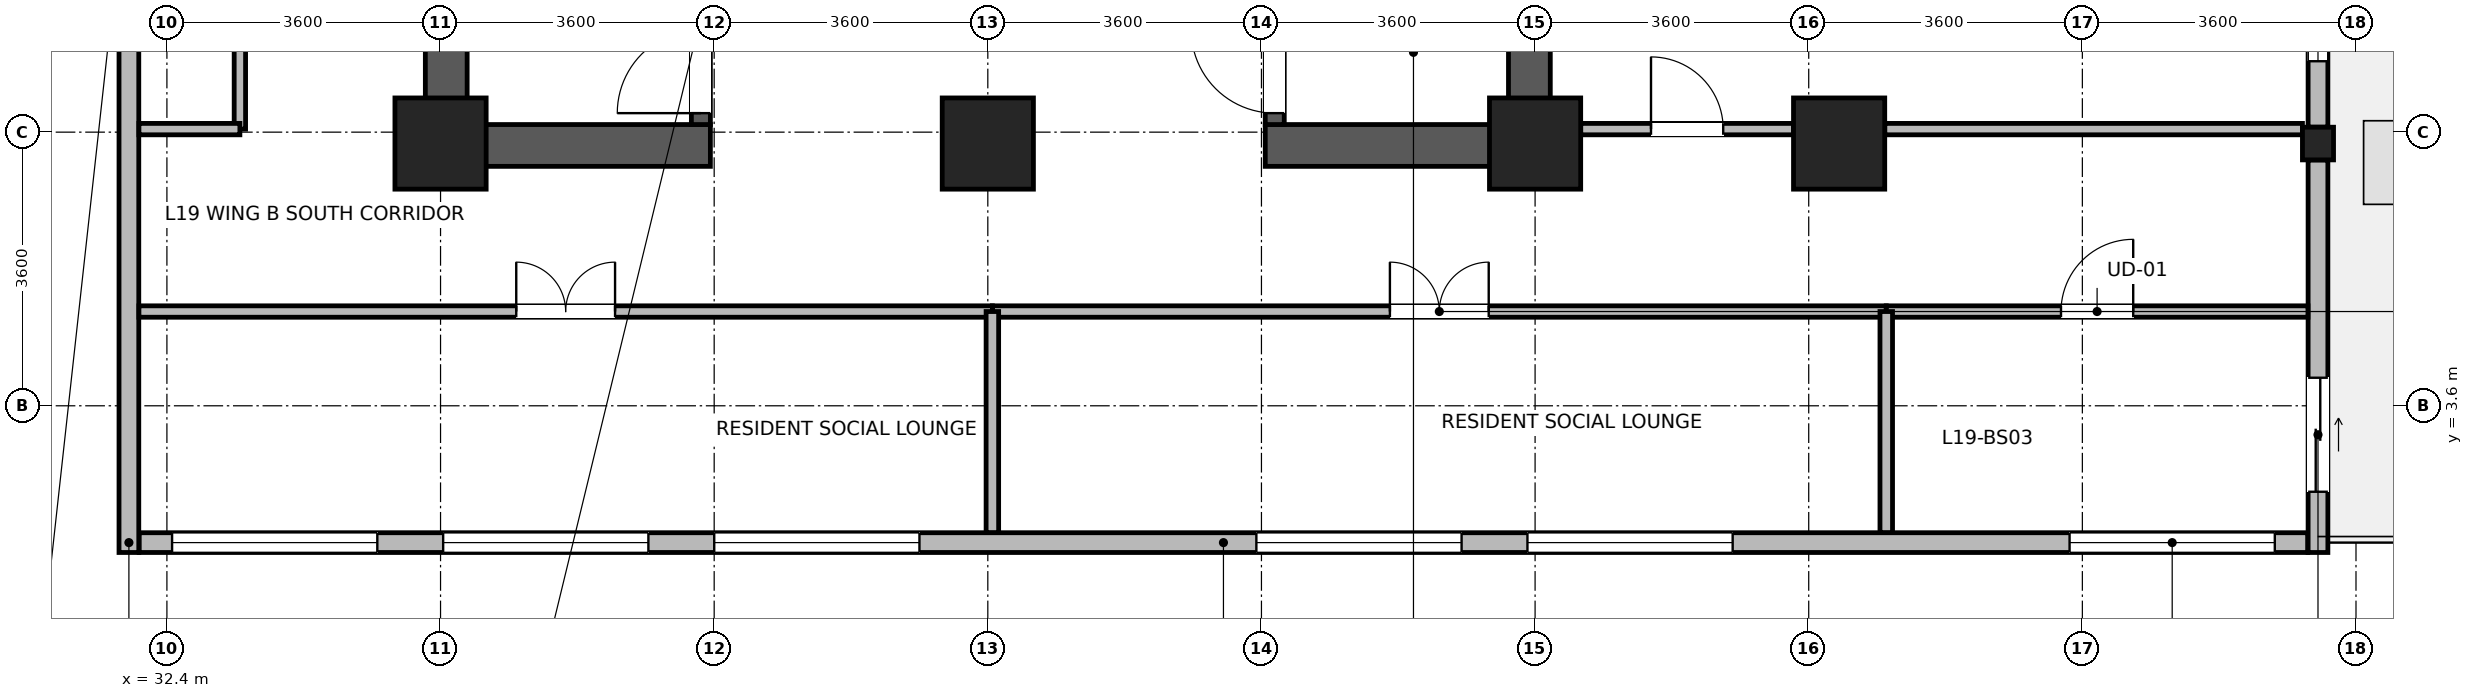
"""IFC4 building model, lengths in metres.
Left out: names, types, materials, properties, quantities, classifications, styles, units other than length and angle.
Written with IfcOpenShell. Run it as: python <this file> out.ifc"""

import sys

from ifc_helpers import new_model, si_unit, direction, frame, frame_2d, origin, origin_2d, place, context, subcontext, project, spatial, rectangle, i_section, extrude, source, transform, mapped, element, fill, save


model = new_model("IFC4")
c1 = context("Model", 3, precision=1e-05, world=origin(), true_north=direction((0.0, 1.0)))
c2 = subcontext(c1, "Body", "Model", "MODEL_VIEW")
j1 = project(units=[si_unit("LENGTHUNIT", "METRE"), si_unit("PLANEANGLEUNIT", "RADIAN")], contexts=[c1])
p1 = place(None, origin())
s1 = spatial("IfcSite", under=j1, at=p1, CompositionType="ELEMENT")
p2 = place(p1, origin())
s2 = spatial("IfcBuilding", under=s1, at=p2, CompositionType="ELEMENT")
p3 = place(p2, frame((0.0, 0.0, 78.6)))
s3 = spatial("IfcBuildingStorey", under=s2, at=p3, CompositionType="ELEMENT", Elevation=78.6)
for number, where, z_axis, x_axis in (
    (1, (36.075, 6.75, 0.0), (0.0, 0.0, 1.0), (0.0, 1.0, 0.0)),
    (2, (50.325, 6.75, 0.0), (0.0, 0.0, 1.0), (0.0, 1.0, 0.0)),
):
    element("IfcWall", number, at=place(p3, frame(where, z_axis=z_axis, x_axis=x_axis)), inside=s3, PredefinedType="SHEAR", context=c2, shape_type="SweptSolid", body=[
        extrude(rectangle(XDim=8.1, YDim=0.55, at=frame_2d((4.05, 0.0))), origin(), (0.0, 0.0, 1.0), 3.45),
    ])
for number, where, z_axis, x_axis in (
    (3, (36.35, 7.025, 0.0), (0.0, 0.0, 1.0), (1.0, 0.0, 0.0)),
    (4, (46.85, 7.025, 0.0), (0.0, 0.0, 1.0), (1.0, 0.0, 0.0)),
):
    element("IfcWall", number, at=place(p3, frame(where, z_axis=z_axis, x_axis=x_axis)), inside=s3, PredefinedType="SHEAR", context=c2, shape_type="SweptSolid", body=[
        extrude(rectangle(XDim=3.2, YDim=0.55, at=frame_2d((1.6, 0.0))), origin(), (0.0, 0.0, 1.0), 3.45),
    ])
p4 = place(p3, frame((39.425, 7.3, 0.0), z_axis=(0.0, 0.0, 1.0), x_axis=(0.0, 1.0, 0.0)))
e5 = element("IfcWall", 5, at=p4, inside=s3, PredefinedType="SHEAR", context=c2, shape_type="SweptSolid", body=[
    extrude(rectangle(XDim=7.0, YDim=0.25, at=frame_2d((3.5, 0.0))), origin(), (0.0, 0.0, 1.0), 3.45),
])
p5 = place(p4, frame((0.15, 0.0, 0.0)))
e6 = element("IfcOpeningElement", 6, at=p5, cuts=e5, PredefinedType="OPENING", context=c2, shape_type="SweptSolid", body=[
    extrude(rectangle(XDim=1.1, YDim=2.08, at=frame_2d((0.55, 1.04))), frame((0.0, 0.135, 0.0), z_axis=(0.0, -1.0, 0.0), x_axis=(1.0, 0.0, 0.0)), (0.0, 0.0, 1.0), 0.27),
])
p6 = place(p3, frame((46.975, 7.3, 0.0), z_axis=(0.0, 0.0, 1.0), x_axis=(0.0, 1.0, 0.0)))
e7 = element("IfcWall", 7, at=p6, inside=s3, PredefinedType="SHEAR", context=c2, shape_type="SweptSolid", body=[
    extrude(rectangle(XDim=7.0, YDim=0.25, at=frame_2d((3.5, 0.0))), origin(), (0.0, 0.0, 1.0), 3.45),
])
p7 = place(p6, frame((0.15, 0.0, 0.0)))
e8 = element("IfcOpeningElement", 8, at=p7, cuts=e7, PredefinedType="OPENING", context=c2, shape_type="SweptSolid", body=[
    extrude(rectangle(XDim=1.1, YDim=2.08, at=frame_2d((0.55, 1.04))), frame((0.0, 0.135, 0.0), z_axis=(0.0, -1.0, 0.0), x_axis=(1.0, 0.0, 0.0)), (0.0, 0.0, 1.0), 0.27),
])
m1 = source(origin(), c2, "Body", "SweptSolid", [
    extrude(rectangle(XDim=1.2, YDim=1.2, at=origin_2d()), origin(), (0.0, 0.0, 1.0), 3.7),
])
for number, where, z_axis, x_axis in (
    (9, (36.0, 7.05, 0.0), (0.0, 0.0, 1.0), (1.0, 0.0, 0.0)),
    (10, (43.2, 7.05, 0.0), (0.0, 0.0, 1.0), (1.0, 0.0, 0.0)),
    (11, (50.4, 7.05, 0.0), (0.0, 0.0, 1.0), (1.0, 0.0, 0.0)),
    (12, (54.4, 7.05, 0.0), (0.0, 0.0, 1.0), (1.0, 0.0, 0.0)),
):
    element("IfcColumn", number, at=place(p3, frame(where, z_axis=z_axis, x_axis=x_axis)), inside=s3, PredefinedType="COLUMN", context=c2, shape_type="MappedRepresentation", body=[
        mapped(m1, transform((0.0, 0.0, 0.0), x_axis=(1.0, 0.0, 0.0), y_axis=(0.0, 1.0, 0.0), z_axis=(0.0, 0.0, 1.0), scale=1.0)),
    ])
m2 = source(origin(), c2, "Body", "SweptSolid", [
    extrude(i_section(OverallWidth=0.409, OverallDepth=0.43, WebThickness=0.024, FlangeThickness=0.033, FilletRadius=0.015, at=origin_2d()), origin(), (0.0, 0.0, 1.0), 3.7),
])
p8 = place(p3, frame((60.7, 7.05, 0.0), z_axis=(0.0, 0.0, 1.0), x_axis=(1.0, 0.0, 0.0)))
e13 = element("IfcColumn", 13, at=p8, inside=s3, PredefinedType="COLUMN", context=c2, shape_type="MappedRepresentation", body=[
    mapped(m2, transform((0.0, 0.0, 0.0), x_axis=(1.0, 0.0, 0.0), y_axis=(0.0, 1.0, 0.0), z_axis=(0.0, 0.0, 1.0), scale=1.0)),
])
p9 = place(p3, frame((60.565, 1.8, 0.0), z_axis=(0.0, 0.0, 1.0), x_axis=(-1.0, 0.0, 0.0)))
e14 = element("IfcWall", 14, at=p9, inside=s3, PredefinedType="STANDARD", context=c2, shape_type="SweptSolid", body=[
    extrude(rectangle(XDim=28.53, YDim=0.26, at=frame_2d((14.265, 0.0))), origin(), (0.0, 0.0, 1.0), 3.43),
])
p10 = place(p9, frame((0.433, 0.0, 0.85)))
e15 = element("IfcOpeningElement", 15, at=p10, cuts=e14, PredefinedType="OPENING", context=c2, shape_type="SweptSolid", body=[
    extrude(rectangle(XDim=2.7, YDim=2.05, at=frame_2d((1.35, 1.025))), frame((0.0, 0.14, 0.0), z_axis=(0.0, -1.0, 0.0), x_axis=(1.0, 0.0, 0.0)), (0.0, 0.0, 1.0), 0.28),
])
p11 = place(p9, frame((7.566, 0.0, 0.85)))
e16 = element("IfcOpeningElement", 16, at=p11, cuts=e14, PredefinedType="OPENING", context=c2, shape_type="SweptSolid", body=[
    extrude(rectangle(XDim=2.7, YDim=2.05, at=frame_2d((1.35, 1.025))), frame((0.0, 0.14, 0.0), z_axis=(0.0, -1.0, 0.0), x_axis=(1.0, 0.0, 0.0)), (0.0, 0.0, 1.0), 0.28),
])
p12 = place(p9, frame((11.132, 0.0, 0.85)))
e17 = element("IfcOpeningElement", 17, at=p12, cuts=e14, PredefinedType="OPENING", context=c2, shape_type="SweptSolid", body=[
    extrude(rectangle(XDim=2.7, YDim=2.05, at=frame_2d((1.35, 1.025))), frame((0.0, 0.14, 0.0), z_axis=(0.0, -1.0, 0.0), x_axis=(1.0, 0.0, 0.0)), (0.0, 0.0, 1.0), 0.28),
])
p13 = place(p9, frame((18.264, 0.0, 0.85)))
e18 = element("IfcOpeningElement", 18, at=p13, cuts=e14, PredefinedType="OPENING", context=c2, shape_type="SweptSolid", body=[
    extrude(rectangle(XDim=2.7, YDim=2.05, at=frame_2d((1.35, 1.025))), frame((0.0, 0.14, 0.0), z_axis=(0.0, -1.0, 0.0), x_axis=(1.0, 0.0, 0.0)), (0.0, 0.0, 1.0), 0.28),
])
p14 = place(p9, frame((21.831, 0.0, 0.85)))
e19 = element("IfcOpeningElement", 19, at=p14, cuts=e14, PredefinedType="OPENING", context=c2, shape_type="SweptSolid", body=[
    extrude(rectangle(XDim=2.7, YDim=2.05, at=frame_2d((1.35, 1.025))), frame((0.0, 0.14, 0.0), z_axis=(0.0, -1.0, 0.0), x_axis=(1.0, 0.0, 0.0)), (0.0, 0.0, 1.0), 0.28),
])
p15 = place(p9, frame((25.397, 0.0, 0.85)))
e20 = element("IfcOpeningElement", 20, at=p15, cuts=e14, PredefinedType="OPENING", context=c2, shape_type="SweptSolid", body=[
    extrude(rectangle(XDim=2.7, YDim=2.05, at=frame_2d((1.35, 1.025))), frame((0.0, 0.14, 0.0), z_axis=(0.0, -1.0, 0.0), x_axis=(1.0, 0.0, 0.0)), (0.0, 0.0, 1.0), 0.28),
])
p16 = place(p3, frame((60.7, 6.834, 0.0), z_axis=(0.0, 0.0, 1.0), x_axis=(0.0, -1.0, 0.0)))
e21 = element("IfcWall", 21, at=p16, inside=s3, PredefinedType="STANDARD", context=c2, shape_type="SweptSolid", body=[
    extrude(rectangle(XDim=5.164, YDim=0.26, at=frame_2d((2.582, 0.0))), origin(), (0.0, 0.0, 1.0), 3.43),
])
p17 = place(p16, frame((2.865, 0.0, 0.0)))
e22 = element("IfcOpeningElement", 22, at=p17, cuts=e21, PredefinedType="OPENING", context=c2, shape_type="SweptSolid", body=[
    extrude(rectangle(XDim=1.5, YDim=2.15, at=frame_2d((0.75, 1.075))), frame((0.0, 0.14, 0.0), z_axis=(0.0, -1.0, 0.0), x_axis=(1.0, 0.0, 0.0)), (0.0, 0.0, 1.0), 0.28),
])
p18 = place(p3, frame((60.7, 14.334, 0.0), z_axis=(0.0, 0.0, 1.0), x_axis=(0.0, -1.0, 0.0)))
e23 = element("IfcWall", 23, at=p18, inside=s3, PredefinedType="STANDARD", context=c2, shape_type="SweptSolid", body=[
    extrude(rectangle(XDim=7.068, YDim=0.26, at=frame_2d((3.534, 0.0))), origin(), (0.0, 0.0, 1.0), 2.93),
])
p19 = place(p18, frame((0.867, 0.0, 0.85)))
e24 = element("IfcOpeningElement", 24, at=p19, cuts=e23, PredefinedType="OPENING", context=c2, shape_type="SweptSolid", body=[
    extrude(rectangle(XDim=1.8, YDim=1.85, at=frame_2d((0.9, 0.925))), frame((0.0, 0.14, 0.0), z_axis=(0.0, -1.0, 0.0), x_axis=(1.0, 0.0, 0.0)), (0.0, 0.0, 1.0), 0.28),
])
p20 = place(p18, frame((4.401, 0.0, 0.85)))
e25 = element("IfcOpeningElement", 25, at=p20, cuts=e23, PredefinedType="OPENING", context=c2, shape_type="SweptSolid", body=[
    extrude(rectangle(XDim=1.8, YDim=1.85, at=frame_2d((0.9, 0.925))), frame((0.0, 0.14, 0.0), z_axis=(0.0, -1.0, 0.0), x_axis=(1.0, 0.0, 0.0)), (0.0, 0.0, 1.0), 0.28),
])
p21 = place(p3, frame((31.9, 1.67, 0.0), z_axis=(0.0, 0.0, 1.0), x_axis=(0.0, 1.0, 0.0)))
e26 = element("IfcWall", 26, at=p21, inside=s3, PredefinedType="STANDARD", context=c2, shape_type="SweptSolid", body=[
    extrude(rectangle(XDim=20.06, YDim=0.26, at=frame_2d((10.03, 0.0))), origin(), (0.0, 0.0, 1.0), 3.43),
])
p22 = place(p21, frame((7.008, 0.0, 0.85)))
e27 = element("IfcOpeningElement", 27, at=p22, cuts=e26, PredefinedType="OPENING", context=c2, shape_type="SweptSolid", body=[
    extrude(rectangle(XDim=2.7, YDim=2.05, at=frame_2d((1.35, 1.025))), frame((0.0, 0.14, 0.0), z_axis=(0.0, -1.0, 0.0), x_axis=(1.0, 0.0, 0.0)), (0.0, 0.0, 1.0), 0.28),
])
p23 = place(p21, frame((13.695, 0.0, 0.85)))
e28 = element("IfcOpeningElement", 28, at=p23, cuts=e26, PredefinedType="OPENING", context=c2, shape_type="SweptSolid", body=[
    extrude(rectangle(XDim=2.7, YDim=2.05, at=frame_2d((1.35, 1.025))), frame((0.0, 0.14, 0.0), z_axis=(0.0, -1.0, 0.0), x_axis=(1.0, 0.0, 0.0)), (0.0, 0.0, 1.0), 0.28),
])
p24 = place(p3, frame((43.26, 4.84, 0.0), z_axis=(0.0, 0.0, 1.0), x_axis=(1.0, 0.0, 0.0)))
e29 = element("IfcWall", 29, at=p24, inside=s3, PredefinedType="PARTITIONING", context=c2, shape_type="SweptSolid", body=[
    extrude(rectangle(XDim=11.76, YDim=0.15, at=frame_2d((5.88, 0.0))), origin(), (0.0, 0.0, 1.0), 3.43),
])
p25 = place(p24, frame((5.23, 0.0, 0.0)))
e30 = element("IfcOpeningElement", 30, at=p25, cuts=e29, PredefinedType="OPENING", context=c2, shape_type="SweptSolid", body=[
    extrude(rectangle(XDim=1.3, YDim=2.12, at=frame_2d((0.65, 1.06))), frame((0.0, 0.085, 0.0), z_axis=(0.0, -1.0, 0.0), x_axis=(1.0, 0.0, 0.0)), (0.0, 0.0, 1.0), 0.17),
])
p26 = place(p3, frame((32.032, 4.84, 0.0), z_axis=(0.0, 0.0, 1.0), x_axis=(1.0, 0.0, 0.0)))
e31 = element("IfcWall", 31, at=p26, inside=s3, PredefinedType="PARTITIONING", context=c2, shape_type="SweptSolid", body=[
    extrude(rectangle(XDim=11.228, YDim=0.15, at=frame_2d((5.614, 0.0))), origin(), (0.0, 0.0, 1.0), 3.43),
])
p27 = place(p26, frame((4.964, 0.0, 0.0)))
e32 = element("IfcOpeningElement", 32, at=p27, cuts=e31, PredefinedType="OPENING", context=c2, shape_type="SweptSolid", body=[
    extrude(rectangle(XDim=1.3, YDim=2.12, at=frame_2d((0.65, 1.06))), frame((0.0, 0.085, 0.0), z_axis=(0.0, -1.0, 0.0), x_axis=(1.0, 0.0, 0.0)), (0.0, 0.0, 1.0), 0.17),
])
p28 = place(p3, frame((51.0, 7.24, 0.0), z_axis=(0.0, 0.0, 1.0), x_axis=(1.0, 0.0, 0.0)))
e33 = element("IfcWall", 33, at=p28, inside=s3, PredefinedType="PARTITIONING", context=c2, shape_type="SweptSolid", body=[
    extrude(rectangle(XDim=2.8, YDim=0.15, at=frame_2d((1.4, 0.0))), origin(), (0.0, 0.0, 1.0), 2.78),
])
p29 = place(p28, frame((0.925, 0.0, 0.0)))
e34 = element("IfcOpeningElement", 34, at=p29, cuts=e33, PredefinedType="OPENING", context=c2, shape_type="SweptSolid", body=[
    extrude(rectangle(XDim=0.95, YDim=2.1, at=frame_2d((0.475, 1.05))), frame((0.0, 0.085, 0.0), z_axis=(0.0, -1.0, 0.0), x_axis=(1.0, 0.0, 0.0)), (0.0, 0.0, 1.0), 0.17),
])
p30 = place(p3, frame((55.0, 7.24, 0.0), z_axis=(0.0, 0.0, 1.0), x_axis=(1.0, 0.0, 0.0)))
e35 = element("IfcWall", 35, at=p30, inside=s3, PredefinedType="PARTITIONING", context=c2, shape_type="SweptSolid", body=[
    extrude(rectangle(XDim=5.496, YDim=0.15, at=frame_2d((2.748, 0.0))), origin(), (0.0, 0.0, 1.0), 2.78),
])
p31 = place(p3, frame((33.36, 7.24, 0.0), z_axis=(0.0, 0.0, 1.0), x_axis=(0.0, 1.0, 0.0)))
e36 = element("IfcWall", 36, at=p31, inside=s3, PredefinedType="PARTITIONING", context=c2, shape_type="SweptSolid", body=[
    extrude(rectangle(XDim=7.26, YDim=0.15, at=frame_2d((3.63, 0.0))), origin(), (0.0, 0.0, 1.0), 3.43),
])
p32 = place(p31, frame((2.98, 0.0, 0.0)))
e37 = element("IfcOpeningElement", 37, at=p32, cuts=e36, PredefinedType="OPENING", context=c2, shape_type="SweptSolid", body=[
    extrude(rectangle(XDim=1.3, YDim=2.12, at=frame_2d((0.65, 1.06))), frame((0.0, 0.085, 0.0), z_axis=(0.0, -1.0, 0.0), x_axis=(1.0, 0.0, 0.0)), (0.0, 0.0, 1.0), 0.17),
])
p33 = place(p3, frame((55.02, 4.84, 0.0), z_axis=(0.0, 0.0, 1.0), x_axis=(1.0, 0.0, 0.0)))
e38 = element("IfcWall", 38, at=p33, inside=s3, PredefinedType="PARTITIONING", context=c2, shape_type="SweptSolid", body=[
    extrude(rectangle(XDim=5.548, YDim=0.15, at=frame_2d((2.774, 0.0))), origin(), (0.0, 0.0, 1.0), 3.43),
])
p34 = place(p33, frame((2.299, 0.0, 0.0)))
e39 = element("IfcOpeningElement", 39, at=p34, cuts=e38, PredefinedType="OPENING", context=c2, shape_type="SweptSolid", body=[
    extrude(rectangle(XDim=0.95, YDim=2.1, at=frame_2d((0.475, 1.05))), frame((0.0, 0.085, 0.0), z_axis=(0.0, -1.0, 0.0), x_axis=(1.0, 0.0, 0.0)), (0.0, 0.0, 1.0), 0.17),
])
p35 = place(p3, frame((32.032, 7.24, 0.0), z_axis=(0.0, 0.0, 1.0), x_axis=(1.0, 0.0, 0.0)))
e40 = element("IfcWall", 40, at=p35, inside=s3, PredefinedType="PARTITIONING", context=c2, shape_type="SweptSolid", body=[
    extrude(rectangle(XDim=1.328, YDim=0.15, at=frame_2d((0.664, 0.0))), origin(), (0.0, 0.0, 1.0), 3.43),
])
for number, where, z_axis, x_axis in (
    (41, (43.26, 1.932, 0.0), (0.0, 0.0, 1.0), (0.0, 1.0, 0.0)),
    (42, (55.02, 1.932, 0.0), (0.0, 0.0, 1.0), (0.0, 1.0, 0.0)),
):
    element("IfcWall", number, at=place(p3, frame(where, z_axis=z_axis, x_axis=x_axis)), inside=s3, PredefinedType="PARTITIONING", context=c2, shape_type="SweptSolid", body=[
        extrude(rectangle(XDim=2.908, YDim=0.165, at=frame_2d((1.454, 0.0))), origin(), (0.0, 0.0, 1.0), 3.43),
    ])
p36 = place(p10, origin())
e43 = element("IfcWindow", 43, at=p36, inside=s3, PartitioningType="SINGLE_PANEL", PredefinedType="WINDOW", context=c2, shape_type="SweptSolid", body=[
    extrude(rectangle(XDim=2.7, YDim=2.05, at=frame_2d((1.35, 1.025))), frame((0.0, 0.03, 0.0), z_axis=(0.0, -1.0, 0.0), x_axis=(1.0, 0.0, 0.0)), (0.0, 0.0, 1.0), 0.06),
])
fill(e15, e43)
p37 = place(p11, origin())
e44 = element("IfcWindow", 44, at=p37, inside=s3, PartitioningType="SINGLE_PANEL", PredefinedType="WINDOW", context=c2, shape_type="SweptSolid", body=[
    extrude(rectangle(XDim=2.7, YDim=2.05, at=frame_2d((1.35, 1.025))), frame((0.0, 0.03, 0.0), z_axis=(0.0, -1.0, 0.0), x_axis=(1.0, 0.0, 0.0)), (0.0, 0.0, 1.0), 0.06),
])
fill(e16, e44)
p38 = place(p12, origin())
e45 = element("IfcWindow", 45, at=p38, inside=s3, PartitioningType="SINGLE_PANEL", PredefinedType="WINDOW", context=c2, shape_type="SweptSolid", body=[
    extrude(rectangle(XDim=2.7, YDim=2.05, at=frame_2d((1.35, 1.025))), frame((0.0, 0.03, 0.0), z_axis=(0.0, -1.0, 0.0), x_axis=(1.0, 0.0, 0.0)), (0.0, 0.0, 1.0), 0.06),
])
fill(e17, e45)
p39 = place(p13, origin())
e46 = element("IfcWindow", 46, at=p39, inside=s3, PartitioningType="SINGLE_PANEL", PredefinedType="WINDOW", context=c2, shape_type="SweptSolid", body=[
    extrude(rectangle(XDim=2.7, YDim=2.05, at=frame_2d((1.35, 1.025))), frame((0.0, 0.03, 0.0), z_axis=(0.0, -1.0, 0.0), x_axis=(1.0, 0.0, 0.0)), (0.0, 0.0, 1.0), 0.06),
])
fill(e18, e46)
p40 = place(p14, origin())
e47 = element("IfcWindow", 47, at=p40, inside=s3, PartitioningType="SINGLE_PANEL", PredefinedType="WINDOW", context=c2, shape_type="SweptSolid", body=[
    extrude(rectangle(XDim=2.7, YDim=2.05, at=frame_2d((1.35, 1.025))), frame((0.0, 0.03, 0.0), z_axis=(0.0, -1.0, 0.0), x_axis=(1.0, 0.0, 0.0)), (0.0, 0.0, 1.0), 0.06),
])
fill(e19, e47)
p41 = place(p15, origin())
e48 = element("IfcWindow", 48, at=p41, inside=s3, PartitioningType="SINGLE_PANEL", PredefinedType="WINDOW", context=c2, shape_type="SweptSolid", body=[
    extrude(rectangle(XDim=2.7, YDim=2.05, at=frame_2d((1.35, 1.025))), frame((0.0, 0.03, 0.0), z_axis=(0.0, -1.0, 0.0), x_axis=(1.0, 0.0, 0.0)), (0.0, 0.0, 1.0), 0.06),
])
fill(e20, e48)
p42 = place(p17, origin())
e49 = element("IfcDoor", 49, at=p42, inside=s3, OperationType="SLIDING_TO_LEFT", PredefinedType="DOOR", context=c2, shape_type="SweptSolid", body=[
    extrude(rectangle(XDim=1.5, YDim=2.15, at=frame_2d((0.75, 1.075))), frame((0.0, 0.025, 0.0), z_axis=(0.0, -1.0, 0.0), x_axis=(1.0, 0.0, 0.0)), (0.0, 0.0, 1.0), 0.05),
])
fill(e22, e49)
p43 = place(p20, origin())
e50 = element("IfcWindow", 50, at=p43, inside=s3, PartitioningType="SINGLE_PANEL", PredefinedType="WINDOW", context=c2, shape_type="SweptSolid", body=[
    extrude(rectangle(XDim=1.8, YDim=1.85, at=frame_2d((0.9, 0.925))), frame((0.0, 0.03, 0.0), z_axis=(0.0, -1.0, 0.0), x_axis=(1.0, 0.0, 0.0)), (0.0, 0.0, 1.0), 0.06),
])
fill(e25, e50)
p44 = place(p5, origin())
e51 = element("IfcDoor", 51, at=p44, inside=s3, OperationType="SINGLE_SWING_LEFT", PredefinedType="DOOR", context=c2, shape_type="SweptSolid", body=[
    extrude(rectangle(XDim=1.1, YDim=2.08, at=frame_2d((0.55, 1.04))), frame((0.0, 0.025, 0.0), z_axis=(0.0, -1.0, 0.0), x_axis=(1.0, 0.0, 0.0)), (0.0, 0.0, 1.0), 0.05),
])
fill(e6, e51)
p45 = place(p7, origin())
e52 = element("IfcDoor", 52, at=p45, inside=s3, OperationType="SINGLE_SWING_RIGHT", PredefinedType="DOOR", context=c2, shape_type="SweptSolid", body=[
    extrude(rectangle(XDim=1.1, YDim=2.08, at=frame_2d((0.55, 1.04))), frame((0.0, 0.025, 0.0), z_axis=(0.0, -1.0, 0.0), x_axis=(1.0, 0.0, 0.0)), (0.0, 0.0, 1.0), 0.05),
])
fill(e8, e52)
p46 = place(p25, origin())
e53 = element("IfcDoor", 53, at=p46, inside=s3, OperationType="DOUBLE_DOOR_SINGLE_SWING", PredefinedType="DOOR", context=c2, shape_type="SweptSolid", body=[
    extrude(rectangle(XDim=1.3, YDim=2.12, at=frame_2d((0.65, 1.06))), frame((0.0, 0.025, 0.0), z_axis=(0.0, -1.0, 0.0), x_axis=(1.0, 0.0, 0.0)), (0.0, 0.0, 1.0), 0.05),
])
fill(e30, e53)
p47 = place(p27, origin())
e54 = element("IfcDoor", 54, at=p47, inside=s3, OperationType="DOUBLE_DOOR_SINGLE_SWING", PredefinedType="DOOR", context=c2, shape_type="SweptSolid", body=[
    extrude(rectangle(XDim=1.3, YDim=2.12, at=frame_2d((0.65, 1.06))), frame((0.0, 0.025, 0.0), z_axis=(0.0, -1.0, 0.0), x_axis=(1.0, 0.0, 0.0)), (0.0, 0.0, 1.0), 0.05),
])
fill(e32, e54)
p48 = place(p29, origin())
e55 = element("IfcDoor", 55, at=p48, inside=s3, OperationType="SINGLE_SWING_LEFT", PredefinedType="DOOR", context=c2, shape_type="SweptSolid", body=[
    extrude(rectangle(XDim=0.95, YDim=2.1, at=frame_2d((0.475, 1.05))), frame((0.0, 0.025, 0.0), z_axis=(0.0, -1.0, 0.0), x_axis=(1.0, 0.0, 0.0)), (0.0, 0.0, 1.0), 0.05),
])
fill(e34, e55)
p49 = place(p34, origin())
e56 = element("IfcDoor", 56, at=p49, inside=s3, OperationType="SINGLE_SWING_RIGHT", PredefinedType="DOOR", context=c2, shape_type="SweptSolid", body=[
    extrude(rectangle(XDim=0.95, YDim=2.1, at=frame_2d((0.475, 1.05))), frame((0.0, 0.025, 0.0), z_axis=(0.0, -1.0, 0.0), x_axis=(1.0, 0.0, 0.0)), (0.0, 0.0, 1.0), 0.05),
])
fill(e39, e56)
save(model, sys.argv[1])
